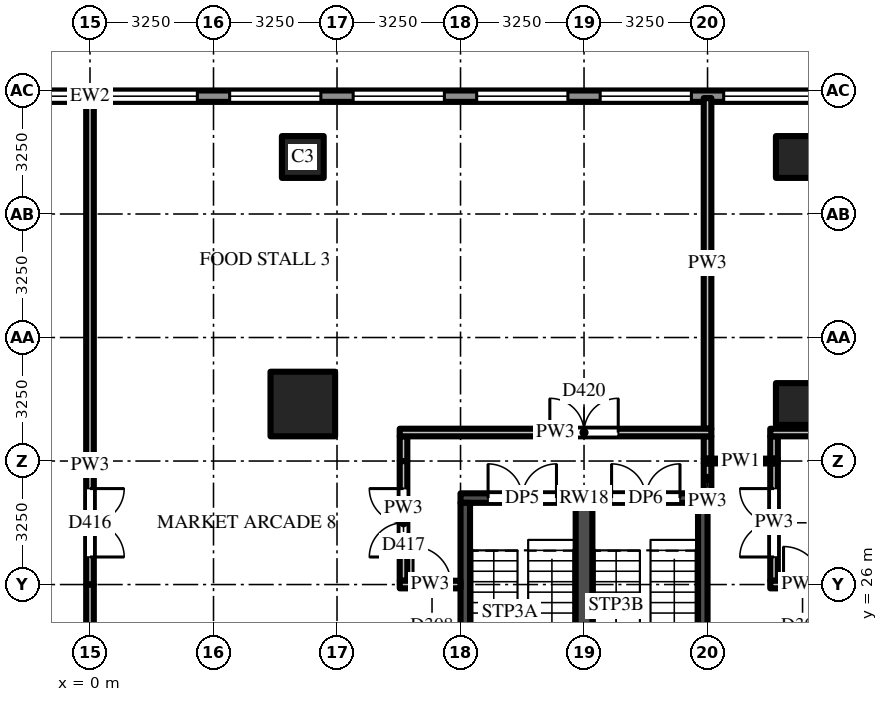
"""IFC4 building model, lengths in metres.
Left out: names, types, materials, properties, quantities, classifications, styles, units other than length and angle.
Written with IfcOpenShell. Run it as: python <this file> out.ifc"""

import sys

from ifc_helpers import new_model, si_unit, direction, frame, frame_2d, origin, origin_2d, place, context, subcontext, project, spatial, rectangle, extrude, source, transform, mapped, element, fill, save


model = new_model("IFC4")
c1 = context("Model", 3, precision=1e-05, world=origin(), true_north=direction((0.0, 1.0)))
c2 = subcontext(c1, "Body", "Model", "MODEL_VIEW")
j1 = project(units=[si_unit("LENGTHUNIT", "METRE"), si_unit("PLANEANGLEUNIT", "RADIAN")], contexts=[c1])
p1 = place(None, origin())
s1 = spatial("IfcSite", under=j1, at=p1, CompositionType="ELEMENT")
p2 = place(p1, origin())
s2 = spatial("IfcBuilding", under=s1, at=p2, CompositionType="ELEMENT")
p3 = place(p2, frame((0.0, 0.0, 14.0)))
s3 = spatial("IfcBuildingStorey", under=s2, at=p3, CompositionType="ELEMENT", Elevation=14.0)
m1 = source(origin(), c2, "Body", "SweptSolid", [
    extrude(rectangle(XDim=1.7, YDim=1.7, at=origin_2d()), origin(), (0.0, 0.0, 1.0), 5.0),
])
p4 = place(p3, frame((5.6, 30.75, 0.0), z_axis=(0.0, 0.0, 1.0), x_axis=(1.0, 0.0, 0.0)))
e1 = element("IfcColumn", 1, at=p4, inside=s3, PredefinedType="COLUMN", context=c2, shape_type="MappedRepresentation", body=[
    mapped(m1, transform((0.0, 0.0, 0.0))),
])
m2 = source(origin(), c2, "Body", "SweptSolid", [
    extrude(rectangle(XDim=1.1, YDim=1.1, at=origin_2d()), origin(), (0.0, 0.0, 1.0), 5.0),
])
for number, where, z_axis, x_axis in (
    (2, (5.6, 37.25, 0.0), (0.0, 0.0, 1.0), (1.0, 0.0, 0.0)),
    (3, (18.6, 30.75, 0.0), (0.0, 0.0, 1.0), (1.0, 0.0, 0.0)),
    (4, (18.6, 37.25, 0.0), (0.0, 0.0, 1.0), (1.0, 0.0, 0.0)),
):
    element("IfcColumn", number, at=place(p3, frame(where, z_axis=z_axis, x_axis=x_axis)), inside=s3, PredefinedType="COLUMN", context=c2, shape_type="MappedRepresentation", body=[
        mapped(m2, transform((0.0, 0.0, 0.0))),
    ])
m3 = source(origin(), c2, "Body", "SweptSolid", [
    extrude(rectangle(XDim=6.5, YDim=0.25, at=frame_2d((3.25, 0.0))), origin(), (0.0, 0.0, 1.0), 4.7),
])
p5 = place(p3, frame((9.75, 28.275, 0.0), z_axis=(0.0, 0.0, 1.0), x_axis=(1.0, 0.0, 0.0)))
e5 = element("IfcWall", 5, at=p5, inside=s3, PredefinedType="SHEAR", context=c2, shape_type="MappedRepresentation", body=[
    mapped(m3, transform((0.0, 0.0, 0.0))),
])
m4 = source(origin(), c2, "Body", "SweptSolid", [
    extrude(rectangle(XDim=1.8, YDim=2.1, at=frame_2d((0.9, 1.05))), frame((0.0, 0.135, 0.0), z_axis=(0.0, -1.0, 0.0), x_axis=(1.0, 0.0, 0.0)), (0.0, 0.0, 1.0), 0.27),
])
p6 = place(p5, frame((0.725, 0.0, 0.0)))
e6 = element("IfcOpeningElement", 6, at=p6, cuts=e5, PredefinedType="OPENING", context=c2, shape_type="MappedRepresentation", body=[
    mapped(m4, transform((0.0, 0.0, 0.0))),
])
p7 = place(p5, frame((3.975, 0.0, 0.0)))
e7 = element("IfcOpeningElement", 7, at=p7, cuts=e5, PredefinedType="OPENING", context=c2, shape_type="MappedRepresentation", body=[
    mapped(m4, transform((0.0, 0.0, 0.0))),
])
m5 = source(origin(), c2, "Body", "SweptSolid", [
    extrude(rectangle(XDim=8.3, YDim=0.25, at=frame_2d((4.15, 0.0))), origin(), (0.0, 0.0, 1.0), 4.7),
])
for number, where, z_axis, x_axis in (
    (8, (9.875, 19.85, 0.0), (0.0, 0.0, 1.0), (0.0, 1.0, 0.0)),
    (9, (16.125, 19.85, 0.0), (0.0, 0.0, 1.0), (0.0, 1.0, 0.0)),
):
    element("IfcWall", number, at=place(p3, frame(where, z_axis=z_axis, x_axis=x_axis)), inside=s3, PredefinedType="SHEAR", context=c2, shape_type="MappedRepresentation", body=[
        mapped(m5, transform((0.0, 0.0, 0.0))),
    ])
m6 = source(origin(), c2, "Body", "SweptSolid", [
    extrude(rectangle(XDim=8.3, YDim=0.44, at=frame_2d((4.15, 0.0))), origin(), (0.0, 0.0, 1.0), 4.7),
])
p8 = place(p3, frame((13.0, 19.85, 0.0), z_axis=(0.0, 0.0, 1.0), x_axis=(0.0, 1.0, 0.0)))
e10 = element("IfcWall", 10, at=p8, inside=s3, PredefinedType="SHEAR", context=c2, shape_type="MappedRepresentation", body=[
    mapped(m6, transform((0.0, 0.0, 0.0))),
])
m7 = source(origin(), c2, "Body", "SweptSolid", [
    extrude(rectangle(XDim=71.5, YDim=0.3, at=frame_2d((35.75, 0.0))), origin(), (0.0, 0.0, 1.0), 4.7),
])
p9 = place(p3, frame((35.75, 38.85, 0.0), z_axis=(0.0, 0.0, 1.0), x_axis=(-1.0, 0.0, 0.0)))
e11 = element("IfcWall", 11, at=p9, inside=s3, PredefinedType="SOLIDWALL", context=c2, shape_type="MappedRepresentation", body=[
    mapped(m7, transform((0.0, 0.0, 0.0))),
])
m8 = source(origin(), c2, "Body", "SweptSolid", [
    extrude(rectangle(XDim=2.4, YDim=3.0, at=frame_2d((1.2, 1.5))), frame((0.0, 0.16, 0.0), z_axis=(0.0, -1.0, 0.0), x_axis=(1.0, 0.0, 0.0)), (0.0, 0.0, 1.0), 0.32),
])
p10 = place(p9, frame((0.425, 0.0, 0.9)))
e12 = element("IfcOpeningElement", 12, at=p10, cuts=e11, PredefinedType="OPENING", context=c2, shape_type="MappedRepresentation", body=[
    mapped(m8, transform((0.0, 0.0, 0.0))),
])
p11 = place(p9, frame((3.675, 0.0, 0.9)))
e13 = element("IfcOpeningElement", 13, at=p11, cuts=e11, PredefinedType="OPENING", context=c2, shape_type="MappedRepresentation", body=[
    mapped(m8, transform((0.0, 0.0, 0.0))),
])
p12 = place(p9, frame((6.925, 0.0, 0.9)))
e14 = element("IfcOpeningElement", 14, at=p12, cuts=e11, PredefinedType="OPENING", context=c2, shape_type="MappedRepresentation", body=[
    mapped(m8, transform((0.0, 0.0, 0.0))),
])
p13 = place(p9, frame((10.175, 0.0, 0.9)))
e15 = element("IfcOpeningElement", 15, at=p13, cuts=e11, PredefinedType="OPENING", context=c2, shape_type="MappedRepresentation", body=[
    mapped(m8, transform((0.0, 0.0, 0.0))),
])
m9 = source(origin(), c2, "Body", "SweptSolid", [
    extrude(rectangle(XDim=1.8, YDim=2.4, at=frame_2d((0.9, 1.2))), frame((0.0, 0.16, 0.0), z_axis=(0.0, -1.0, 0.0), x_axis=(1.0, 0.0, 0.0)), (0.0, 0.0, 1.0), 0.32),
])
p14 = place(p9, frame((13.725, 0.0, 0.0)))
e16 = element("IfcOpeningElement", 16, at=p14, cuts=e11, PredefinedType="OPENING", context=c2, shape_type="MappedRepresentation", body=[
    mapped(m9, transform((0.0, 0.0, 0.0))),
])
p15 = place(p9, frame((16.675, 0.0, 0.9)))
e17 = element("IfcOpeningElement", 17, at=p15, cuts=e11, PredefinedType="OPENING", context=c2, shape_type="MappedRepresentation", body=[
    mapped(m8, transform((0.0, 0.0, 0.0))),
])
p16 = place(p9, frame((19.925, 0.0, 0.9)))
e18 = element("IfcOpeningElement", 18, at=p16, cuts=e11, PredefinedType="OPENING", context=c2, shape_type="MappedRepresentation", body=[
    mapped(m8, transform((0.0, 0.0, 0.0))),
])
p17 = place(p9, frame((23.175, 0.0, 0.9)))
e19 = element("IfcOpeningElement", 19, at=p17, cuts=e11, PredefinedType="OPENING", context=c2, shape_type="MappedRepresentation", body=[
    mapped(m8, transform((0.0, 0.0, 0.0))),
])
p18 = place(p9, frame((26.425, 0.0, 0.9)))
e20 = element("IfcOpeningElement", 20, at=p18, cuts=e11, PredefinedType="OPENING", context=c2, shape_type="MappedRepresentation", body=[
    mapped(m8, transform((0.0, 0.0, 0.0))),
])
p19 = place(p9, frame((29.675, 0.0, 0.9)))
e21 = element("IfcOpeningElement", 21, at=p19, cuts=e11, PredefinedType="OPENING", context=c2, shape_type="MappedRepresentation", body=[
    mapped(m8, transform((0.0, 0.0, 0.0))),
])
p20 = place(p9, frame((32.925, 0.0, 0.9)))
e22 = element("IfcOpeningElement", 22, at=p20, cuts=e11, PredefinedType="OPENING", context=c2, shape_type="MappedRepresentation", body=[
    mapped(m8, transform((0.0, 0.0, 0.0))),
])
p21 = place(p9, frame((36.175, 0.0, 0.9)))
e23 = element("IfcOpeningElement", 23, at=p21, cuts=e11, PredefinedType="OPENING", context=c2, shape_type="MappedRepresentation", body=[
    mapped(m8, transform((0.0, 0.0, 0.0))),
])
p22 = place(p9, frame((39.425, 0.0, 0.9)))
e24 = element("IfcOpeningElement", 24, at=p22, cuts=e11, PredefinedType="OPENING", context=c2, shape_type="MappedRepresentation", body=[
    mapped(m8, transform((0.0, 0.0, 0.0))),
])
p23 = place(p9, frame((42.675, 0.0, 0.9)))
e25 = element("IfcOpeningElement", 25, at=p23, cuts=e11, PredefinedType="OPENING", context=c2, shape_type="MappedRepresentation", body=[
    mapped(m8, transform((0.0, 0.0, 0.0))),
])
p24 = place(p9, frame((45.925, 0.0, 0.9)))
e26 = element("IfcOpeningElement", 26, at=p24, cuts=e11, PredefinedType="OPENING", context=c2, shape_type="MappedRepresentation", body=[
    mapped(m8, transform((0.0, 0.0, 0.0))),
])
p25 = place(p9, frame((49.175, 0.0, 0.9)))
e27 = element("IfcOpeningElement", 27, at=p25, cuts=e11, PredefinedType="OPENING", context=c2, shape_type="MappedRepresentation", body=[
    mapped(m8, transform((0.0, 0.0, 0.0))),
])
p26 = place(p9, frame((52.425, 0.0, 0.9)))
e28 = element("IfcOpeningElement", 28, at=p26, cuts=e11, PredefinedType="OPENING", context=c2, shape_type="MappedRepresentation", body=[
    mapped(m8, transform((0.0, 0.0, 0.0))),
])
p27 = place(p9, frame((55.675, 0.0, 0.9)))
e29 = element("IfcOpeningElement", 29, at=p27, cuts=e11, PredefinedType="OPENING", context=c2, shape_type="MappedRepresentation", body=[
    mapped(m8, transform((0.0, 0.0, 0.0))),
])
p28 = place(p9, frame((58.925, 0.0, 0.9)))
e30 = element("IfcOpeningElement", 30, at=p28, cuts=e11, PredefinedType="OPENING", context=c2, shape_type="MappedRepresentation", body=[
    mapped(m8, transform((0.0, 0.0, 0.0))),
])
p29 = place(p9, frame((62.175, 0.0, 0.9)))
e31 = element("IfcOpeningElement", 31, at=p29, cuts=e11, PredefinedType="OPENING", context=c2, shape_type="MappedRepresentation", body=[
    mapped(m8, transform((0.0, 0.0, 0.0))),
])
p30 = place(p9, frame((65.425, 0.0, 0.9)))
e32 = element("IfcOpeningElement", 32, at=p30, cuts=e11, PredefinedType="OPENING", context=c2, shape_type="MappedRepresentation", body=[
    mapped(m8, transform((0.0, 0.0, 0.0))),
])
p31 = place(p9, frame((68.675, 0.0, 0.9)))
e33 = element("IfcOpeningElement", 33, at=p31, cuts=e11, PredefinedType="OPENING", context=c2, shape_type="MappedRepresentation", body=[
    mapped(m8, transform((0.0, 0.0, 0.0))),
])
m10 = source(origin(), c2, "Body", "SweptSolid", [
    extrude(rectangle(XDim=3.25, YDim=0.2, at=frame_2d((1.625, 0.0))), origin(), (0.0, 0.0, 1.0), 3.996),
])
p32 = place(p3, frame((0.0, 29.25, 0.0), z_axis=(0.0, 0.0, 1.0), x_axis=(0.0, -1.0, 0.0)))
e34 = element("IfcWall", 34, at=p32, inside=s3, PredefinedType="PARTITIONING", context=c2, shape_type="MappedRepresentation", body=[
    mapped(m10, transform((0.0, 0.0, 0.0))),
])
m11 = source(origin(), c2, "Body", "SweptSolid", [
    extrude(rectangle(XDim=1.8, YDim=2.1, at=frame_2d((0.9, 1.05))), frame((0.0, 0.11, 0.0), z_axis=(0.0, -1.0, 0.0), x_axis=(1.0, 0.0, 0.0)), (0.0, 0.0, 1.0), 0.22),
])
p33 = place(p32, frame((0.725, 0.0, 0.0)))
e35 = element("IfcOpeningElement", 35, at=p33, cuts=e34, PredefinedType="OPENING", context=c2, shape_type="MappedRepresentation", body=[
    mapped(m11, transform((0.0, 0.0, 0.0))),
])
m12 = source(origin(), c2, "Body", "SweptSolid", [
    extrude(rectangle(XDim=6.5, YDim=0.2, at=frame_2d((3.25, 0.0))), origin(), (0.0, 0.0, 1.0), 3.996),
])
p34 = place(p3, frame((0.0, 26.0, 0.0), z_axis=(0.0, 0.0, 1.0), x_axis=(0.0, -1.0, 0.0)))
e36 = element("IfcWall", 36, at=p34, inside=s3, PredefinedType="PARTITIONING", context=c2, shape_type="MappedRepresentation", body=[
    mapped(m12, transform((0.0, 0.0, 0.0))),
])
m13 = source(origin(), c2, "Body", "SweptSolid", [
    extrude(rectangle(XDim=9.55, YDim=0.2, at=frame_2d((4.775, 0.0))), origin(), (0.0, 0.0, 1.0), 3.918),
])
p35 = place(p3, frame((0.0, 38.8, 0.0), z_axis=(0.0, 0.0, 1.0), x_axis=(0.0, -1.0, 0.0)))
e37 = element("IfcWall", 37, at=p35, inside=s3, PredefinedType="PARTITIONING", context=c2, shape_type="MappedRepresentation", body=[
    mapped(m13, transform((0.0, 0.0, 0.0))),
])
m14 = source(origin(), c2, "Body", "SweptSolid", [
    extrude(rectangle(XDim=3.15, YDim=0.2, at=frame_2d((1.575, 0.0))), origin(), (0.0, 0.0, 1.0), 4.274),
])
p36 = place(p3, frame((8.25, 26.1, 0.0), z_axis=(0.0, 0.0, 1.0), x_axis=(0.0, 1.0, 0.0)))
e38 = element("IfcWall", 38, at=p36, inside=s3, PredefinedType="PARTITIONING", context=c2, shape_type="MappedRepresentation", body=[
    mapped(m14, transform((0.0, 0.0, 0.0))),
])
p37 = place(p36, frame((0.625, 0.0, 0.0)))
e39 = element("IfcOpeningElement", 39, at=p37, cuts=e38, PredefinedType="OPENING", context=c2, shape_type="MappedRepresentation", body=[
    mapped(m11, transform((0.0, 0.0, 0.0))),
])
m15 = source(origin(), c2, "Body", "SweptSolid", [
    extrude(rectangle(XDim=0.65, YDim=0.2, at=frame_2d((0.325, 0.0))), origin(), (0.0, 0.0, 1.0), 4.7),
])
p38 = place(p3, frame((8.25, 29.25, 0.0), z_axis=(0.0, 0.0, 1.0), x_axis=(0.0, 1.0, 0.0)))
e40 = element("IfcWall", 40, at=p38, inside=s3, PredefinedType="PARTITIONING", context=c2, shape_type="MappedRepresentation", body=[
    mapped(m15, transform((0.0, 0.0, 0.0))),
])
m16 = source(origin(), c2, "Body", "SweptSolid", [
    extrude(rectangle(XDim=0.788, YDim=0.2, at=frame_2d((0.394, 0.0))), origin(), (0.0, 0.0, 1.0), 4.7),
])
p39 = place(p3, frame((16.25, 28.4, 0.0), z_axis=(0.0, 0.0, 1.0), x_axis=(0.0, 1.0, 0.0)))
e41 = element("IfcWall", 41, at=p39, inside=s3, PredefinedType="PARTITIONING", context=c2, shape_type="MappedRepresentation", body=[
    mapped(m16, transform((0.0, 0.0, 0.0))),
])
m17 = source(origin(), c2, "Body", "SweptSolid", [
    extrude(rectangle(XDim=8.7, YDim=0.2, at=frame_2d((4.35, 0.0))), origin(), (0.0, 0.0, 1.0), 3.762),
])
p40 = place(p3, frame((16.25, 30.1, 0.0), z_axis=(0.0, 0.0, 1.0), x_axis=(0.0, 1.0, 0.0)))
e42 = element("IfcWall", 42, at=p40, inside=s3, PredefinedType="PARTITIONING", context=c2, shape_type="MappedRepresentation", body=[
    mapped(m17, transform((0.0, 0.0, 0.0))),
])
m18 = source(origin(), c2, "Body", "SweptSolid", [
    extrude(rectangle(XDim=0.587, YDim=0.2, at=frame_2d((0.294, 0.0))), origin(), (0.0, 0.0, 1.0), 4.7),
])
p41 = place(p3, frame((16.25, 29.9, 0.0), z_axis=(0.0, 0.0, 1.0), x_axis=(0.0, -1.0, 0.0)))
e43 = element("IfcWall", 43, at=p41, inside=s3, PredefinedType="PARTITIONING", context=c2, shape_type="MappedRepresentation", body=[
    mapped(m18, transform((0.0, 0.0, 0.0))),
])
m19 = source(origin(), c2, "Body", "SweptSolid", [
    extrude(rectangle(XDim=3.087, YDim=0.2, at=frame_2d((1.544, 0.0))), origin(), (0.0, 0.0, 1.0), 4.274),
])
p42 = place(p3, frame((18.0, 26.1, 0.0), z_axis=(0.0, 0.0, 1.0), x_axis=(0.0, 1.0, 0.0)))
e44 = element("IfcWall", 44, at=p42, inside=s3, PredefinedType="PARTITIONING", context=c2, shape_type="MappedRepresentation", body=[
    mapped(m19, transform((0.0, 0.0, 0.0))),
])
p43 = place(p42, frame((0.625, 0.0, 0.0)))
e45 = element("IfcOpeningElement", 45, at=p43, cuts=e44, PredefinedType="OPENING", context=c2, shape_type="MappedRepresentation", body=[
    mapped(m11, transform((0.0, 0.0, 0.0))),
])
p44 = place(p3, frame((18.0, 29.9, 0.0), z_axis=(0.0, 0.0, 1.0), x_axis=(0.0, -1.0, 0.0)))
e46 = element("IfcWall", 46, at=p44, inside=s3, PredefinedType="PARTITIONING", context=c2, shape_type="MappedRepresentation", body=[
    mapped(m18, transform((0.0, 0.0, 0.0))),
])
m20 = source(origin(), c2, "Body", "SweptSolid", [
    extrude(rectangle(XDim=1.6, YDim=0.2, at=frame_2d((0.8, 0.0))), origin(), (0.0, 0.0, 1.0), 4.7),
])
p45 = place(p3, frame((8.15, 26.0, 0.0), z_axis=(0.0, 0.0, 1.0), x_axis=(1.0, 0.0, 0.0)))
e47 = element("IfcWall", 47, at=p45, inside=s3, PredefinedType="PARTITIONING", context=c2, shape_type="MappedRepresentation", body=[
    mapped(m20, transform((0.0, 0.0, 0.0))),
])
m21 = source(origin(), c2, "Body", "SweptSolid", [
    extrude(rectangle(XDim=1.0, YDim=2.1, at=frame_2d((0.5, 1.05))), frame((0.0, 0.11, 0.0), z_axis=(0.0, -1.0, 0.0), x_axis=(1.0, 0.0, 0.0)), (0.0, 0.0, 1.0), 0.22),
])
p46 = place(p45, frame((0.35, 0.0, 0.0)))
e48 = element("IfcOpeningElement", 48, at=p46, cuts=e47, PredefinedType="OPENING", context=c2, shape_type="MappedRepresentation", body=[
    mapped(m21, transform((0.0, 0.0, 0.0))),
])
m22 = source(origin(), c2, "Body", "SweptSolid", [
    extrude(rectangle(XDim=1.6, YDim=0.2, at=frame_2d((0.8, 0.0))), origin(), (0.0, 0.0, 1.0), 3.762),
])
p47 = place(p3, frame((17.9, 26.0, 0.0), z_axis=(0.0, 0.0, 1.0), x_axis=(1.0, 0.0, 0.0)))
e49 = element("IfcWall", 49, at=p47, inside=s3, PredefinedType="PARTITIONING", context=c2, shape_type="MappedRepresentation", body=[
    mapped(m22, transform((0.0, 0.0, 0.0))),
])
p48 = place(p47, frame((0.35, 0.0, 0.0)))
e50 = element("IfcOpeningElement", 50, at=p48, cuts=e49, PredefinedType="OPENING", context=c2, shape_type="MappedRepresentation", body=[
    mapped(m21, transform((0.0, 0.0, 0.0))),
])
m23 = source(origin(), c2, "Body", "SweptSolid", [
    extrude(rectangle(XDim=1.95, YDim=0.125, at=frame_2d((0.975, 0.0))), origin(), (0.0, 0.0, 1.0), 4.7),
])
p49 = place(p3, frame((16.15, 29.25, 0.0), z_axis=(0.0, 0.0, 1.0), x_axis=(1.0, 0.0, 0.0)))
e51 = element("IfcWall", 51, at=p49, inside=s3, PredefinedType="PARTITIONING", context=c2, shape_type="MappedRepresentation", body=[
    mapped(m23, transform((0.0, 0.0, 0.0))),
])
m24 = source(origin(), c2, "Body", "SweptSolid", [
    extrude(rectangle(XDim=8.2, YDim=0.2, at=frame_2d((4.1, 0.0))), origin(), (0.0, 0.0, 1.0), 4.7),
])
p50 = place(p3, frame((8.15, 30.0, 0.0), z_axis=(0.0, 0.0, 1.0), x_axis=(1.0, 0.0, 0.0)))
e52 = element("IfcWall", 52, at=p50, inside=s3, PredefinedType="PARTITIONING", context=c2, shape_type="MappedRepresentation", body=[
    mapped(m24, transform((0.0, 0.0, 0.0))),
])
p51 = place(p50, frame((3.95, 0.0, 0.0)))
e53 = element("IfcOpeningElement", 53, at=p51, cuts=e52, PredefinedType="OPENING", context=c2, shape_type="MappedRepresentation", body=[
    mapped(m11, transform((0.0, 0.0, 0.0))),
])
m25 = source(origin(), c2, "Body", "SweptSolid", [
    extrude(rectangle(XDim=8.2, YDim=0.2, at=frame_2d((4.1, 0.0))), origin(), (0.0, 0.0, 1.0), 3.762),
])
p52 = place(p3, frame((17.9, 30.0, 0.0), z_axis=(0.0, 0.0, 1.0), x_axis=(1.0, 0.0, 0.0)))
e54 = element("IfcWall", 54, at=p52, inside=s3, PredefinedType="PARTITIONING", context=c2, shape_type="MappedRepresentation", body=[
    mapped(m25, transform((0.0, 0.0, 0.0))),
])
m26 = source(origin(), c2, "Body", "SweptSolid", [
    extrude(rectangle(XDim=1.8, YDim=2.1, at=frame_2d((0.9, 1.05))), frame((0.0, 0.025, 0.0), z_axis=(0.0, -1.0, 0.0), x_axis=(1.0, 0.0, 0.0)), (0.0, 0.0, 1.0), 0.05),
])
p53 = place(p6, origin())
e55 = element("IfcDoor", 55, at=p53, inside=s3, OperationType="DOUBLE_DOOR_SINGLE_SWING", PredefinedType="DOOR", context=c2, shape_type="MappedRepresentation", body=[
    mapped(m26, transform((0.0, 0.0, 0.0))),
])
fill(e6, e55)
p54 = place(p7, origin())
e56 = element("IfcDoor", 56, at=p54, inside=s3, OperationType="DOUBLE_DOOR_SINGLE_SWING", PredefinedType="DOOR", context=c2, shape_type="MappedRepresentation", body=[
    mapped(m26, transform((0.0, 0.0, 0.0))),
])
fill(e7, e56)
m27 = source(origin(), c2, "Body", "SweptSolid", [
    extrude(rectangle(XDim=2.4, YDim=3.0, at=frame_2d((1.2, 1.5))), frame((0.0, 0.03, 0.0), z_axis=(0.0, -1.0, 0.0), x_axis=(1.0, 0.0, 0.0)), (0.0, 0.0, 1.0), 0.06),
])
p55 = place(p15, origin())
e57 = element("IfcWindow", 57, at=p55, inside=s3, PartitioningType="SINGLE_PANEL", PredefinedType="WINDOW", context=c2, shape_type="MappedRepresentation", body=[
    mapped(m27, transform((0.0, 0.0, 0.0))),
])
fill(e17, e57)
p56 = place(p16, origin())
e58 = element("IfcWindow", 58, at=p56, inside=s3, PartitioningType="SINGLE_PANEL", PredefinedType="WINDOW", context=c2, shape_type="MappedRepresentation", body=[
    mapped(m27, transform((0.0, 0.0, 0.0))),
])
fill(e18, e58)
p57 = place(p17, origin())
e59 = element("IfcWindow", 59, at=p57, inside=s3, PartitioningType="SINGLE_PANEL", PredefinedType="WINDOW", context=c2, shape_type="MappedRepresentation", body=[
    mapped(m27, transform((0.0, 0.0, 0.0))),
])
fill(e19, e59)
p58 = place(p18, origin())
e60 = element("IfcWindow", 60, at=p58, inside=s3, PartitioningType="SINGLE_PANEL", PredefinedType="WINDOW", context=c2, shape_type="MappedRepresentation", body=[
    mapped(m27, transform((0.0, 0.0, 0.0))),
])
fill(e20, e60)
p59 = place(p19, origin())
e61 = element("IfcWindow", 61, at=p59, inside=s3, PartitioningType="SINGLE_PANEL", PredefinedType="WINDOW", context=c2, shape_type="MappedRepresentation", body=[
    mapped(m27, transform((0.0, 0.0, 0.0))),
])
fill(e21, e61)
p60 = place(p20, origin())
e62 = element("IfcWindow", 62, at=p60, inside=s3, PartitioningType="SINGLE_PANEL", PredefinedType="WINDOW", context=c2, shape_type="MappedRepresentation", body=[
    mapped(m27, transform((0.0, 0.0, 0.0))),
])
fill(e22, e62)
p61 = place(p21, origin())
e63 = element("IfcWindow", 63, at=p61, inside=s3, PartitioningType="SINGLE_PANEL", PredefinedType="WINDOW", context=c2, shape_type="MappedRepresentation", body=[
    mapped(m27, transform((0.0, 0.0, 0.0))),
])
fill(e23, e63)
m28 = source(origin(), c2, "Body", "SweptSolid", [
    extrude(rectangle(XDim=1.0, YDim=2.1, at=frame_2d((0.5, 1.05))), frame((0.0, 0.025, 0.0), z_axis=(0.0, -1.0, 0.0), x_axis=(1.0, 0.0, 0.0)), (0.0, 0.0, 1.0), 0.05),
])
p62 = place(p46, origin())
e64 = element("IfcDoor", 64, at=p62, inside=s3, OperationType="SINGLE_SWING_LEFT", PredefinedType="DOOR", context=c2, shape_type="MappedRepresentation", body=[
    mapped(m28, transform((0.0, 0.0, 0.0))),
])
fill(e48, e64)
p63 = place(p48, origin())
e65 = element("IfcDoor", 65, at=p63, inside=s3, OperationType="SINGLE_SWING_LEFT", PredefinedType="DOOR", context=c2, shape_type="MappedRepresentation", body=[
    mapped(m28, transform((0.0, 0.0, 0.0))),
])
fill(e50, e65)
p64 = place(p33, origin())
e66 = element("IfcDoor", 66, at=p64, inside=s3, OperationType="DOUBLE_DOOR_SINGLE_SWING", PredefinedType="DOOR", context=c2, shape_type="MappedRepresentation", body=[
    mapped(m26, transform((0.0, 0.0, 0.0))),
])
fill(e35, e66)
p65 = place(p37, origin())
e67 = element("IfcDoor", 67, at=p65, inside=s3, OperationType="DOUBLE_DOOR_SINGLE_SWING", PredefinedType="DOOR", context=c2, shape_type="MappedRepresentation", body=[
    mapped(m26, transform((0.0, 0.0, 0.0))),
])
fill(e39, e67)
p66 = place(p43, origin())
e68 = element("IfcDoor", 68, at=p66, inside=s3, OperationType="DOUBLE_DOOR_SINGLE_SWING", PredefinedType="DOOR", context=c2, shape_type="MappedRepresentation", body=[
    mapped(m26, transform((0.0, 0.0, 0.0))),
])
fill(e45, e68)
p67 = place(p51, origin())
e69 = element("IfcDoor", 69, at=p67, inside=s3, OperationType="DOUBLE_DOOR_SINGLE_SWING", PredefinedType="DOOR", context=c2, shape_type="MappedRepresentation", body=[
    mapped(m26, transform((0.0, 0.0, 0.0))),
])
fill(e53, e69)
save(model, sys.argv[1])
